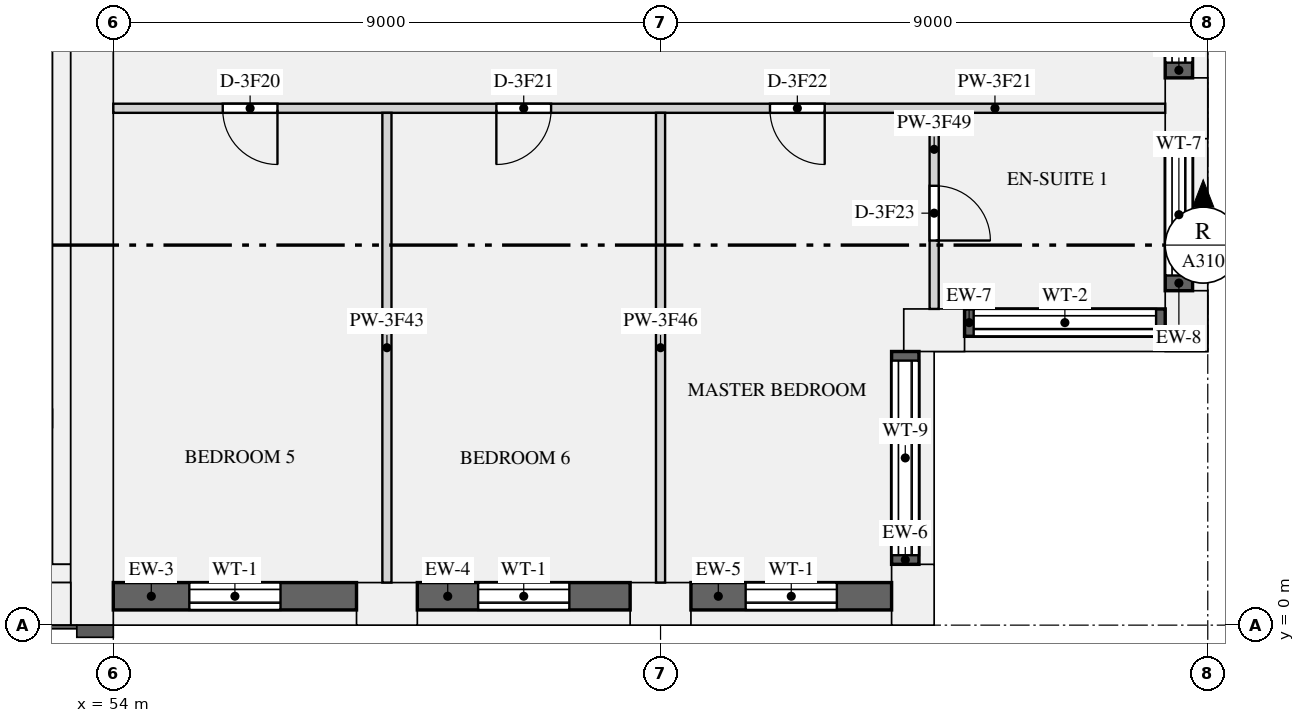
"""IFC4 building model, lengths in metres.
Left out: names, types, materials, properties, quantities, classifications, styles, units other than length and angle.
Written with IfcOpenShell. Run it as: python <this file> out.ifc"""

import sys

from ifc_helpers import new_model, si_unit, direction, frame, frame_2d, origin, origin_2d, place, context, subcontext, project, spatial, rectangle, extrude, element, fill, save


model = new_model("IFC4")
c1 = context("Model", 3, precision=1e-05, world=origin(), true_north=direction((0.0, 1.0)))
c2 = subcontext(c1, "Body", "Model", "MODEL_VIEW")
j1 = project(units=[si_unit("LENGTHUNIT", "METRE"), si_unit("PLANEANGLEUNIT", "RADIAN")], contexts=[c1])
p1 = place(None, origin())
s1 = spatial("IfcSite", under=j1, at=p1, CompositionType="ELEMENT")
p2 = place(p1, origin())
s2 = spatial("IfcBuilding", under=s1, at=p2, CompositionType="ELEMENT")
p3 = place(p2, frame((0.0, 0.0, 179.1)))
s3 = spatial("IfcBuildingStorey", under=s2, at=p3, CompositionType="ELEMENT", Elevation=179.1)
for number, where, z_axis, x_axis in (
    (1, (58.5, 0.35, 0.0), (0.0, 0.0, 1.0), (1.0, 0.0, 0.0)),
    (2, (63.0, 0.35, 0.0), (0.0, 0.0, 1.0), (1.0, 0.0, 0.0)),
    (3, (67.15, 0.5, 0.0), (0.0, 0.0, 1.0), (0.0, 1.0, 0.0)),
    (4, (67.5, 4.85, 0.0), (0.0, 0.0, 1.0), (1.0, 0.0, 0.0)),
    (5, (71.65, 5.0, 0.0), (0.0, 0.0, 1.0), (0.0, 1.0, 0.0)),
    (6, (71.65, 8.5, 0.0), (0.0, 0.0, 1.0), (0.0, 1.0, 0.0)),
):
    element("IfcColumn", number, at=place(p3, frame(where, z_axis=z_axis, x_axis=x_axis)), inside=s3, PredefinedType="USERDEFINED", context=c2, shape_type="SweptSolid", body=[
        extrude(rectangle(XDim=1.0, YDim=0.7, at=origin_2d()), origin(), (0.0, 0.0, 1.0), 3.15),
    ])
p4 = place(p3, frame((53.65, 0.0, 0.0), z_axis=(0.0, 0.0, 1.0), x_axis=(0.0, 1.0, 0.0)))
e7 = element("IfcWall", 7, at=p4, inside=s3, PredefinedType="SHEAR", context=c2, shape_type="SweptSolid", body=[
    extrude(rectangle(XDim=12.5, YDim=0.7, at=frame_2d((6.25, 0.0))), origin(), (0.0, 0.0, 1.0), 3.15),
])
p5 = place(p3, frame((18.7, 0.35, 0.0), z_axis=(0.0, 0.0, 1.0), x_axis=(1.0, 0.0, 0.0)))
e8 = element("IfcWall", 8, at=p5, inside=s3, PredefinedType="SHEAR", context=c2, shape_type="SweptSolid", body=[
    extrude(rectangle(XDim=34.6, YDim=0.7, at=frame_2d((17.3, 0.0))), origin(), (0.0, 0.0, 1.0), 3.15),
])
p6 = place(p3, frame((53.15, 1.0, 0.0), z_axis=(0.0, 0.0, 1.0), x_axis=(0.0, 1.0, 0.0)))
e9 = element("IfcWall", 9, at=p6, inside=s3, PredefinedType="SHEAR", context=c2, shape_type="SweptSolid", body=[
    extrude(rectangle(XDim=10.9, YDim=0.3, at=frame_2d((5.45, 0.0))), origin(), (0.0, 0.0, 1.0), 3.15),
])
p7 = place(p3, frame((18.7, 0.85, 0.0), z_axis=(0.0, 0.0, 1.0), x_axis=(1.0, 0.0, 0.0)))
e10 = element("IfcWall", 10, at=p7, inside=s3, PredefinedType="SHEAR", context=c2, shape_type="SweptSolid", body=[
    extrude(rectangle(XDim=34.6, YDim=0.3, at=frame_2d((17.3, 0.0))), origin(), (0.0, 0.0, 1.0), 3.15),
])
p8 = place(p3, frame((54.0, 0.475, 0.9), z_axis=(0.0, 0.0, 1.0), x_axis=(1.0, 0.0, 0.0)))
e11 = element("IfcWall", 11, at=p8, inside=s3, PredefinedType="SOLIDWALL", context=c2, shape_type="SweptSolid", body=[
    extrude(rectangle(XDim=4.0, YDim=0.45, at=frame_2d((2.0, 0.0))), origin(), (0.0, 0.0, 1.0), 1.93),
])
p9 = place(p8, frame((1.25, 0.0, 0.15)))
e12 = element("IfcOpeningElement", 12, at=p9, cuts=e11, PredefinedType="OPENING", context=c2, shape_type="SweptSolid", body=[
    extrude(rectangle(XDim=1.5, YDim=1.5, at=frame_2d((0.75, 0.75))), frame((0.0, 0.235, 0.0), z_axis=(0.0, -1.0, 0.0), x_axis=(1.0, 0.0, 0.0)), (0.0, 0.0, 1.0), 0.47),
])
p10 = place(p3, frame((59.0, 0.475, 0.9), z_axis=(0.0, 0.0, 1.0), x_axis=(1.0, 0.0, 0.0)))
e13 = element("IfcWall", 13, at=p10, inside=s3, PredefinedType="SOLIDWALL", context=c2, shape_type="SweptSolid", body=[
    extrude(rectangle(XDim=3.5, YDim=0.45, at=frame_2d((1.75, 0.0))), origin(), (0.0, 0.0, 1.0), 1.93),
])
p11 = place(p10, frame((1.0, 0.0, 0.15)))
e14 = element("IfcOpeningElement", 14, at=p11, cuts=e13, PredefinedType="OPENING", context=c2, shape_type="SweptSolid", body=[
    extrude(rectangle(XDim=1.5, YDim=1.5, at=frame_2d((0.75, 0.75))), frame((0.0, 0.235, 0.0), z_axis=(0.0, -1.0, 0.0), x_axis=(1.0, 0.0, 0.0)), (0.0, 0.0, 1.0), 0.47),
])
p12 = place(p3, frame((63.5, 0.475, 0.9), z_axis=(0.0, 0.0, 1.0), x_axis=(1.0, 0.0, 0.0)))
e15 = element("IfcWall", 15, at=p12, inside=s3, PredefinedType="SOLIDWALL", context=c2, shape_type="SweptSolid", body=[
    extrude(rectangle(XDim=3.3, YDim=0.45, at=frame_2d((1.65, 0.0))), origin(), (0.0, 0.0, 1.0), 1.93),
])
p13 = place(p12, frame((0.9, 0.0, 0.15)))
e16 = element("IfcOpeningElement", 16, at=p13, cuts=e15, PredefinedType="OPENING", context=c2, shape_type="SweptSolid", body=[
    extrude(rectangle(XDim=1.5, YDim=1.5, at=frame_2d((0.75, 0.75))), frame((0.0, 0.235, 0.0), z_axis=(0.0, -1.0, 0.0), x_axis=(1.0, 0.0, 0.0)), (0.0, 0.0, 1.0), 0.47),
])
p14 = place(p3, frame((67.025, 1.0, 0.9), z_axis=(0.0, 0.0, 1.0), x_axis=(0.0, 1.0, 0.0)))
e17 = element("IfcWall", 17, at=p14, inside=s3, PredefinedType="SOLIDWALL", context=c2, shape_type="SweptSolid", body=[
    extrude(rectangle(XDim=3.5, YDim=0.45, at=frame_2d((1.75, 0.0))), origin(), (0.0, 0.0, 1.0), 1.93),
])
p15 = place(p14, frame((0.15, 0.0, 0.15)))
e18 = element("IfcOpeningElement", 18, at=p15, cuts=e17, PredefinedType="OPENING", context=c2, shape_type="SweptSolid", body=[
    extrude(rectangle(XDim=3.2, YDim=1.5, at=frame_2d((1.6, 0.75))), frame((0.0, 0.235, 0.0), z_axis=(0.0, -1.0, 0.0), x_axis=(1.0, 0.0, 0.0)), (0.0, 0.0, 1.0), 0.47),
])
p16 = place(p3, frame((68.0, 4.975, 0.9), z_axis=(0.0, 0.0, 1.0), x_axis=(1.0, 0.0, 0.0)))
e19 = element("IfcWall", 19, at=p16, inside=s3, PredefinedType="SOLIDWALL", context=c2, shape_type="SweptSolid", body=[
    extrude(rectangle(XDim=3.3, YDim=0.45, at=frame_2d((1.65, 0.0))), origin(), (0.0, 0.0, 1.0), 1.93),
])
p17 = place(p16, frame((0.15, 0.0, 0.15)))
e20 = element("IfcOpeningElement", 20, at=p17, cuts=e19, PredefinedType="OPENING", context=c2, shape_type="SweptSolid", body=[
    extrude(rectangle(XDim=3.0, YDim=1.5, at=frame_2d((1.5, 0.75))), frame((0.0, 0.235, 0.0), z_axis=(0.0, -1.0, 0.0), x_axis=(1.0, 0.0, 0.0)), (0.0, 0.0, 1.0), 0.47),
])
p18 = place(p3, frame((71.525, 5.5, 0.9), z_axis=(0.0, 0.0, 1.0), x_axis=(0.0, 1.0, 0.0)))
e21 = element("IfcWall", 21, at=p18, inside=s3, PredefinedType="SOLIDWALL", context=c2, shape_type="SweptSolid", body=[
    extrude(rectangle(XDim=2.5, YDim=0.45, at=frame_2d((1.25, 0.0))), origin(), (0.0, 0.0, 1.0), 1.93),
])
p19 = place(p18, frame((0.25, 0.0, 0.15)))
e22 = element("IfcOpeningElement", 22, at=p19, cuts=e21, PredefinedType="OPENING", context=c2, shape_type="SweptSolid", body=[
    extrude(rectangle(XDim=2.0, YDim=1.5, at=frame_2d((1.0, 0.75))), frame((0.0, 0.235, 0.0), z_axis=(0.0, -1.0, 0.0), x_axis=(1.0, 0.0, 0.0)), (0.0, 0.0, 1.0), 0.47),
])
p20 = place(p3, frame((71.525, 9.0, 0.9), z_axis=(0.0, 0.0, 1.0), x_axis=(0.0, 1.0, 0.0)))
e23 = element("IfcWall", 23, at=p20, inside=s3, PredefinedType="SOLIDWALL", context=c2, shape_type="SweptSolid", body=[
    extrude(rectangle(XDim=3.0, YDim=0.45, at=frame_2d((1.5, 0.0))), origin(), (0.0, 0.0, 1.0), 1.93),
])
p21 = place(p20, frame((0.25, 0.0, 0.15)))
e24 = element("IfcOpeningElement", 24, at=p21, cuts=e23, PredefinedType="OPENING", context=c2, shape_type="SweptSolid", body=[
    extrude(rectangle(XDim=2.5, YDim=1.5, at=frame_2d((1.25, 0.75))), frame((0.0, 0.235, 0.0), z_axis=(0.0, -1.0, 0.0), x_axis=(1.0, 0.0, 0.0)), (0.0, 0.0, 1.0), 0.47),
])
p22 = place(p3, frame((54.0, 8.5, 0.0), z_axis=(0.0, 0.0, 1.0), x_axis=(1.0, 0.0, 0.0)))
e25 = element("IfcWall", 25, at=p22, inside=s3, PredefinedType="PARTITIONING", context=c2, shape_type="SweptSolid", body=[
    extrude(rectangle(XDim=17.3, YDim=0.15, at=frame_2d((8.65, 0.0))), origin(), (0.0, 0.0, 1.0), 2.83),
])
p23 = place(p22, frame((1.8, 0.0, 0.0)))
e26 = element("IfcOpeningElement", 26, at=p23, cuts=e25, PredefinedType="OPENING", context=c2, shape_type="SweptSolid", body=[
    extrude(rectangle(XDim=0.9, YDim=2.1, at=frame_2d((0.45, 1.05))), frame((0.0, 0.085, 0.0), z_axis=(0.0, -1.0, 0.0), x_axis=(1.0, 0.0, 0.0)), (0.0, 0.0, 1.0), 0.17),
])
p24 = place(p22, frame((6.3, 0.0, 0.0)))
e27 = element("IfcOpeningElement", 27, at=p24, cuts=e25, PredefinedType="OPENING", context=c2, shape_type="SweptSolid", body=[
    extrude(rectangle(XDim=0.9, YDim=2.1, at=frame_2d((0.45, 1.05))), frame((0.0, 0.085, 0.0), z_axis=(0.0, -1.0, 0.0), x_axis=(1.0, 0.0, 0.0)), (0.0, 0.0, 1.0), 0.17),
])
p25 = place(p22, frame((10.8, 0.0, 0.0)))
e28 = element("IfcOpeningElement", 28, at=p25, cuts=e25, PredefinedType="OPENING", context=c2, shape_type="SweptSolid", body=[
    extrude(rectangle(XDim=0.9, YDim=2.1, at=frame_2d((0.45, 1.05))), frame((0.0, 0.085, 0.0), z_axis=(0.0, -1.0, 0.0), x_axis=(1.0, 0.0, 0.0)), (0.0, 0.0, 1.0), 0.17),
])
for number, where, z_axis, x_axis in (
    (29, (58.5, 0.7, 0.0), (0.0, 0.0, 1.0), (0.0, 1.0, 0.0)),
    (30, (63.0, 0.7, 0.0), (0.0, 0.0, 1.0), (0.0, 1.0, 0.0)),
):
    element("IfcWall", number, at=place(p3, frame(where, z_axis=z_axis, x_axis=x_axis)), inside=s3, PredefinedType="PARTITIONING", context=c2, shape_type="SweptSolid", body=[
        extrude(rectangle(XDim=7.725, YDim=0.15, at=frame_2d((3.863, 0.0))), origin(), (0.0, 0.0, 1.0), 2.83),
    ])
p26 = place(p3, frame((67.5, 5.2, 0.0), z_axis=(0.0, 0.0, 1.0), x_axis=(0.0, 1.0, 0.0)))
e31 = element("IfcWall", 31, at=p26, inside=s3, PredefinedType="PARTITIONING", context=c2, shape_type="SweptSolid", body=[
    extrude(rectangle(XDim=3.225, YDim=0.15, at=frame_2d((1.613, 0.0))), origin(), (0.0, 0.0, 1.0), 2.83),
])
p27 = place(p26, frame((1.125, 0.0, 0.0)))
e32 = element("IfcOpeningElement", 32, at=p27, cuts=e31, PredefinedType="OPENING", context=c2, shape_type="SweptSolid", body=[
    extrude(rectangle(XDim=0.9, YDim=2.1, at=frame_2d((0.45, 1.05))), frame((0.0, 0.085, 0.0), z_axis=(0.0, -1.0, 0.0), x_axis=(1.0, 0.0, 0.0)), (0.0, 0.0, 1.0), 0.17),
])
p28 = place(p9, origin())
e33 = element("IfcWindow", 33, at=p28, inside=s3, PartitioningType="SINGLE_PANEL", PredefinedType="WINDOW", context=c2, shape_type="SweptSolid", body=[
    extrude(rectangle(XDim=1.5, YDim=1.5, at=frame_2d((0.75, 0.75))), frame((0.0, -0.065, 0.0), z_axis=(0.0, -1.0, 0.0), x_axis=(1.0, 0.0, 0.0)), (0.0, 0.0, 1.0), 0.06),
])
fill(e12, e33)
p29 = place(p11, origin())
e34 = element("IfcWindow", 34, at=p29, inside=s3, PartitioningType="SINGLE_PANEL", PredefinedType="WINDOW", context=c2, shape_type="SweptSolid", body=[
    extrude(rectangle(XDim=1.5, YDim=1.5, at=frame_2d((0.75, 0.75))), frame((0.0, -0.065, 0.0), z_axis=(0.0, -1.0, 0.0), x_axis=(1.0, 0.0, 0.0)), (0.0, 0.0, 1.0), 0.06),
])
fill(e14, e34)
p30 = place(p13, origin())
e35 = element("IfcWindow", 35, at=p30, inside=s3, PartitioningType="SINGLE_PANEL", PredefinedType="WINDOW", context=c2, shape_type="SweptSolid", body=[
    extrude(rectangle(XDim=1.5, YDim=1.5, at=frame_2d((0.75, 0.75))), frame((0.0, -0.065, 0.0), z_axis=(0.0, -1.0, 0.0), x_axis=(1.0, 0.0, 0.0)), (0.0, 0.0, 1.0), 0.06),
])
fill(e16, e35)
p31 = place(p15, origin())
e36 = element("IfcWindow", 36, at=p31, inside=s3, PartitioningType="SINGLE_PANEL", PredefinedType="WINDOW", context=c2, shape_type="SweptSolid", body=[
    extrude(rectangle(XDim=3.2, YDim=1.5, at=frame_2d((1.6, 0.75))), frame((0.0, -0.065, 0.0), z_axis=(0.0, -1.0, 0.0), x_axis=(1.0, 0.0, 0.0)), (0.0, 0.0, 1.0), 0.06),
])
fill(e18, e36)
p32 = place(p17, origin())
e37 = element("IfcWindow", 37, at=p32, inside=s3, PartitioningType="SINGLE_PANEL", PredefinedType="WINDOW", context=c2, shape_type="SweptSolid", body=[
    extrude(rectangle(XDim=3.0, YDim=1.5, at=frame_2d((1.5, 0.75))), frame((0.0, -0.065, 0.0), z_axis=(0.0, -1.0, 0.0), x_axis=(1.0, 0.0, 0.0)), (0.0, 0.0, 1.0), 0.06),
])
fill(e20, e37)
p33 = place(p19, origin())
e38 = element("IfcWindow", 38, at=p33, inside=s3, PartitioningType="SINGLE_PANEL", PredefinedType="WINDOW", context=c2, shape_type="SweptSolid", body=[
    extrude(rectangle(XDim=2.0, YDim=1.5, at=frame_2d((1.0, 0.75))), frame((0.0, -0.065, 0.0), z_axis=(0.0, -1.0, 0.0), x_axis=(1.0, 0.0, 0.0)), (0.0, 0.0, 1.0), 0.06),
])
fill(e22, e38)
p34 = place(p21, origin())
e39 = element("IfcWindow", 39, at=p34, inside=s3, PartitioningType="SINGLE_PANEL", PredefinedType="WINDOW", context=c2, shape_type="SweptSolid", body=[
    extrude(rectangle(XDim=2.5, YDim=1.5, at=frame_2d((1.25, 0.75))), frame((0.0, -0.065, 0.0), z_axis=(0.0, -1.0, 0.0), x_axis=(1.0, 0.0, 0.0)), (0.0, 0.0, 1.0), 0.06),
])
fill(e24, e39)
p35 = place(p23, frame((0.9, 0.0, 0.0), z_axis=(0.0, 0.0, 1.0), x_axis=(-1.0, 0.0, 0.0)))
e40 = element("IfcDoor", 40, at=p35, inside=s3, OperationType="SINGLE_SWING_LEFT", PredefinedType="DOOR", context=c2, shape_type="SweptSolid", body=[
    extrude(rectangle(XDim=0.9, YDim=2.1, at=frame_2d((0.45, 1.05))), frame((0.0, 0.025, 0.0), z_axis=(0.0, -1.0, 0.0), x_axis=(1.0, 0.0, 0.0)), (0.0, 0.0, 1.0), 0.05),
])
fill(e26, e40)
p36 = place(p24, frame((0.9, 0.0, 0.0), z_axis=(0.0, 0.0, 1.0), x_axis=(-1.0, 0.0, 0.0)))
e41 = element("IfcDoor", 41, at=p36, inside=s3, OperationType="SINGLE_SWING_RIGHT", PredefinedType="DOOR", context=c2, shape_type="SweptSolid", body=[
    extrude(rectangle(XDim=0.9, YDim=2.1, at=frame_2d((0.45, 1.05))), frame((0.0, 0.025, 0.0), z_axis=(0.0, -1.0, 0.0), x_axis=(1.0, 0.0, 0.0)), (0.0, 0.0, 1.0), 0.05),
])
fill(e27, e41)
p37 = place(p25, frame((0.9, 0.0, 0.0), z_axis=(0.0, 0.0, 1.0), x_axis=(-1.0, 0.0, 0.0)))
e42 = element("IfcDoor", 42, at=p37, inside=s3, OperationType="SINGLE_SWING_LEFT", PredefinedType="DOOR", context=c2, shape_type="SweptSolid", body=[
    extrude(rectangle(XDim=0.9, YDim=2.1, at=frame_2d((0.45, 1.05))), frame((0.0, 0.025, 0.0), z_axis=(0.0, -1.0, 0.0), x_axis=(1.0, 0.0, 0.0)), (0.0, 0.0, 1.0), 0.05),
])
fill(e28, e42)
p38 = place(p27, frame((0.9, 0.0, 0.0), z_axis=(0.0, 0.0, 1.0), x_axis=(-1.0, 0.0, 0.0)))
e43 = element("IfcDoor", 43, at=p38, inside=s3, OperationType="SINGLE_SWING_RIGHT", PredefinedType="DOOR", context=c2, shape_type="SweptSolid", body=[
    extrude(rectangle(XDim=0.9, YDim=2.1, at=frame_2d((0.45, 1.05))), frame((0.0, 0.025, 0.0), z_axis=(0.0, -1.0, 0.0), x_axis=(1.0, 0.0, 0.0)), (0.0, 0.0, 1.0), 0.05),
])
fill(e32, e43)
save(model, sys.argv[1])
